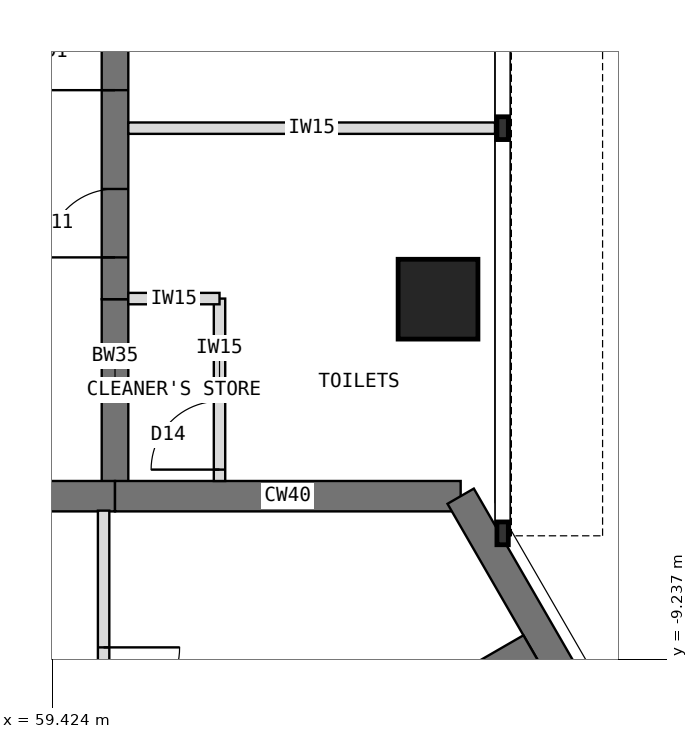
"""IFC4 building model, lengths in metres.
Left out: names, types, materials, properties, quantities, classifications, styles, units other than length and angle.
Written with IfcOpenShell. Run it as: python <this file> out.ifc"""

import sys

from ifc_helpers import new_model, si_unit, direction, frame, frame_2d, origin, origin_2d, place, context, subcontext, project, spatial, rectangle, extrude, element, fill, save


model = new_model("IFC4")
c1 = context("Model", 3, precision=1e-05, world=origin(), true_north=direction((0.0, 1.0)))
c2 = subcontext(c1, "Body", "Model", "MODEL_VIEW")
j1 = project(units=[si_unit("LENGTHUNIT", "METRE"), si_unit("PLANEANGLEUNIT", "RADIAN")], contexts=[c1])
p1 = place(None, origin())
s1 = spatial("IfcSite", under=j1, at=p1, CompositionType="ELEMENT")
p2 = place(p1, origin())
s2 = spatial("IfcBuilding", under=s1, at=p2, CompositionType="ELEMENT")
p3 = place(p2, frame((0.0, 0.0, 247.5)))
s3 = spatial("IfcBuildingStorey", under=s2, at=p3, CompositionType="ELEMENT", Elevation=247.5)
p4 = place(p3, frame((64.798, -7.092, 0.0), z_axis=(0.0, 0.0, 1.0), x_axis=(-1.0, 0.0, 0.0)))
e1 = element("IfcWall", 1, at=p4, inside=s3, PredefinedType="SHEAR", context=c2, shape_type="SweptSolid", body=[
    extrude(rectangle(XDim=4.548, YDim=0.4, at=frame_2d((2.274, 0.0))), origin(), (0.0, 0.0, 1.0), 4.0),
])
p5 = place(p3, frame((60.25, -7.092, 0.0), z_axis=(0.0, 0.0, 1.0), x_axis=(-1.0, 0.0, 0.0)))
e2 = element("IfcWall", 2, at=p5, inside=s3, PredefinedType="SHEAR", context=c2, shape_type="SweptSolid", body=[
    extrude(rectangle(XDim=3.5, YDim=0.4, at=frame_2d((1.75, 0.0))), origin(), (0.0, 0.0, 1.0), 4.0),
])
p6 = place(p5, frame((0.85, 0.0, 0.0)))
e3 = element("IfcOpeningElement", 3, at=p6, cuts=e2, PredefinedType="OPENING", context=c2, shape_type="SweptSolid", body=[
    extrude(rectangle(XDim=1.8, YDim=2.1, at=frame_2d((0.9, 1.05))), frame((0.0, 0.21, 0.0), z_axis=(0.0, -1.0, 0.0), x_axis=(1.0, 0.0, 0.0)), (0.0, 0.0, 1.0), 0.42),
])
p7 = place(p3, frame((71.096, -18.0, 0.0), z_axis=(0.0, 0.0, 1.0), x_axis=(-0.500005998175, 0.866021940709, 0.0)))
e4 = element("IfcWall", 4, at=p7, inside=s3, PredefinedType="SHEAR", context=c2, shape_type="SweptSolid", body=[
    extrude(rectangle(XDim=12.596, YDim=0.4, at=frame_2d((6.298, 0.0))), origin(), (0.0, 0.0, 1.0), 4.0),
])
p8 = place(p3, frame((60.25, -7.092, 0.0), z_axis=(0.0, 0.0, 1.0), x_axis=(0.0, 1.0, 0.0)))
e5 = element("IfcWall", 5, at=p8, inside=s3, PredefinedType="SHEAR", context=c2, shape_type="SweptSolid", body=[
    extrude(rectangle(XDim=2.592, YDim=0.35, at=frame_2d((1.296, 0.0))), origin(), (0.0, 0.0, 1.0), 4.0),
])
p9 = place(p3, frame((60.25, -4.5, 0.0), z_axis=(0.0, 0.0, 1.0), x_axis=(0.0, 1.0, 0.0)))
e6 = element("IfcWall", 6, at=p9, inside=s3, PredefinedType="SHEAR", context=c2, shape_type="SweptSolid", body=[
    extrude(rectangle(XDim=13.2, YDim=0.35, at=frame_2d((6.6, 0.0))), origin(), (0.0, 0.0, 1.0), 4.0),
])
p10 = place(p9, frame((0.55, 0.0, 0.0)))
e7 = element("IfcOpeningElement", 7, at=p10, cuts=e6, PredefinedType="OPENING", context=c2, shape_type="SweptSolid", body=[
    extrude(rectangle(XDim=0.9, YDim=2.1, at=frame_2d((0.45, 1.05))), frame((0.0, 0.185, 0.0), z_axis=(0.0, -1.0, 0.0), x_axis=(1.0, 0.0, 0.0)), (0.0, 0.0, 1.0), 0.37),
])
p11 = place(p9, frame((2.75, 0.0, 0.0)))
e8 = element("IfcOpeningElement", 8, at=p11, cuts=e6, PredefinedType="OPENING", context=c2, shape_type="SweptSolid", body=[
    extrude(rectangle(XDim=1.0, YDim=2.1, at=frame_2d((0.5, 1.05))), frame((0.0, 0.185, 0.0), z_axis=(0.0, -1.0, 0.0), x_axis=(1.0, 0.0, 0.0)), (0.0, 0.0, 1.0), 0.37),
])
p12 = place(p3, frame((64.5, -4.5, 0.0), z_axis=(0.0, 0.0, 1.0), x_axis=(1.0, 0.0, 0.0)))
e9 = element("IfcColumn", 9, at=p12, inside=s3, PredefinedType="COLUMN", context=c2, shape_type="SweptSolid", body=[
    extrude(rectangle(XDim=1.05, YDim=1.05, at=origin_2d()), origin(), (0.0, 0.0, 1.0), 4.0),
])
p13 = place(p3, frame((60.52, -12.099, 0.0), z_axis=(0.0, 0.0, 1.0), x_axis=(0.866026570101, 0.499997979876, 0.0)))
e10 = element("IfcWall", 10, at=p13, inside=s3, PredefinedType="SHEAR", context=c2, shape_type="SweptSolid", body=[
    extrude(rectangle(XDim=6.008, YDim=0.4, at=frame_2d((3.004, 0.0))), origin(), (0.0, 0.0, 1.0), 4.0),
])
p14 = place(p3, frame((60.425, -2.25, 0.0), z_axis=(0.0, 0.0, 1.0), x_axis=(1.0, 0.0, 0.0)))
e11 = element("IfcWall", 11, at=p14, inside=s3, PredefinedType="PARTITIONING", context=c2, shape_type="SweptSolid", body=[
    extrude(rectangle(XDim=4.825, YDim=0.15, at=frame_2d((2.413, 0.0))), origin(), (0.0, 0.0, 1.0), 3.8),
])
p15 = place(p3, frame((61.625, -6.892, 0.0), z_axis=(0.0, 0.0, 1.0), x_axis=(0.0, 1.0, 0.0)))
e12 = element("IfcWall", 12, at=p15, inside=s3, PredefinedType="PARTITIONING", context=c2, shape_type="SweptSolid", body=[
    extrude(rectangle(XDim=2.4, YDim=0.15, at=frame_2d((1.2, 0.0))), origin(), (0.0, 0.0, 1.0), 3.8),
])
p16 = place(p15, frame((0.15, 0.0, 0.0)))
e13 = element("IfcOpeningElement", 13, at=p16, cuts=e12, PredefinedType="OPENING", context=c2, shape_type="SweptSolid", body=[
    extrude(rectangle(XDim=0.9, YDim=2.1, at=frame_2d((0.45, 1.05))), frame((0.0, 0.085, 0.0), z_axis=(0.0, -1.0, 0.0), x_axis=(1.0, 0.0, 0.0)), (0.0, 0.0, 1.0), 0.17),
])
p17 = place(p3, frame((60.425, -4.492, 0.0), z_axis=(0.0, 0.0, 1.0), x_axis=(1.0, 0.0, 0.0)))
e14 = element("IfcWall", 14, at=p17, inside=s3, PredefinedType="PARTITIONING", context=c2, shape_type="SweptSolid", body=[
    extrude(rectangle(XDim=1.2, YDim=0.15, at=frame_2d((0.6, 0.0))), origin(), (0.0, 0.0, 1.0), 3.267),
])
p18 = place(p3, frame((60.1, -7.282, 0.0), z_axis=(0.0, 0.0, 1.0), x_axis=(0.0, -1.0, 0.0)))
e15 = element("IfcWall", 15, at=p18, inside=s3, PredefinedType="PARTITIONING", context=c2, shape_type="SweptSolid", body=[
    extrude(rectangle(XDim=4.618, YDim=0.15, at=frame_2d((2.309, 0.0))), origin(), (0.0, 0.0, 1.0), 3.8),
])
p19 = place(p18, frame((1.799, 0.0, 0.0)))
e16 = element("IfcOpeningElement", 16, at=p19, cuts=e15, PredefinedType="OPENING", context=c2, shape_type="SweptSolid", body=[
    extrude(rectangle(XDim=1.0, YDim=2.1, at=frame_2d((0.5, 1.05))), frame((0.0, 0.085, 0.0), z_axis=(0.0, -1.0, 0.0), x_axis=(1.0, 0.0, 0.0)), (0.0, 0.0, 1.0), 0.17),
])
p20 = place(p16, origin())
e17 = element("IfcDoor", 17, at=p20, inside=s3, OperationType="SINGLE_SWING_LEFT", PredefinedType="DOOR", context=c2, shape_type="SweptSolid", body=[
    extrude(rectangle(XDim=0.9, YDim=2.1, at=frame_2d((0.45, 1.05))), frame((0.0, 0.025, 0.0), z_axis=(0.0, -1.0, 0.0), x_axis=(1.0, 0.0, 0.0)), (0.0, 0.0, 1.0), 0.05),
])
fill(e13, e17)
p21 = place(p19, origin())
e18 = element("IfcDoor", 18, at=p21, inside=s3, OperationType="SINGLE_SWING_LEFT", PredefinedType="DOOR", context=c2, shape_type="SweptSolid", body=[
    extrude(rectangle(XDim=1.0, YDim=2.1, at=frame_2d((0.5, 1.05))), frame((0.0, 0.025, 0.0), z_axis=(0.0, -1.0, 0.0), x_axis=(1.0, 0.0, 0.0)), (0.0, 0.0, 1.0), 0.05),
])
fill(e16, e18)
p22 = place(p10, origin())
e19 = element("IfcDoor", 19, at=p22, inside=s3, OperationType="SINGLE_SWING_LEFT", PredefinedType="DOOR", context=c2, shape_type="SweptSolid", body=[
    extrude(rectangle(XDim=0.9, YDim=2.1, at=frame_2d((0.45, 1.05))), frame((0.0, 0.025, 0.0), z_axis=(0.0, -1.0, 0.0), x_axis=(1.0, 0.0, 0.0)), (0.0, 0.0, 1.0), 0.05),
])
fill(e7, e19)
p23 = place(p11, origin())
e20 = element("IfcDoor", 20, at=p23, inside=s3, OperationType="SINGLE_SWING_LEFT", PredefinedType="DOOR", context=c2, shape_type="SweptSolid", body=[
    extrude(rectangle(XDim=1.0, YDim=2.1, at=frame_2d((0.5, 1.05))), frame((0.0, 0.025, 0.0), z_axis=(0.0, -1.0, 0.0), x_axis=(1.0, 0.0, 0.0)), (0.0, 0.0, 1.0), 0.05),
])
fill(e8, e20)
save(model, sys.argv[1])
